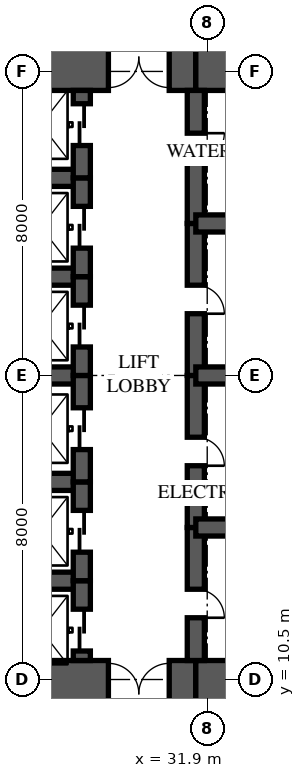
"""IFC4 building model, lengths in metres.
Left out: names, types, materials, properties, quantities, classifications, styles, units other than length and angle.
Written with IfcOpenShell. Run it as: python <this file> out.ifc"""

import sys

from ifc_helpers import new_model, si_unit, direction, frame, frame_2d, origin, place, context, subcontext, project, spatial, rectangle, extrude, element, fill, save


model = new_model("IFC4")
c1 = context("Model", 3, precision=1e-05, world=origin(), true_north=direction((0.0, 1.0)))
c2 = subcontext(c1, "Body", "Model", "MODEL_VIEW")
j1 = project(units=[si_unit("LENGTHUNIT", "METRE"), si_unit("PLANEANGLEUNIT", "RADIAN")], contexts=[c1])
p1 = place(None, origin())
s1 = spatial("IfcSite", under=j1, at=p1, CompositionType="ELEMENT")
p2 = place(p1, origin())
s2 = spatial("IfcBuilding", under=s1, at=p2, CompositionType="ELEMENT")
p3 = place(p2, origin())
s3 = spatial("IfcBuildingStorey", under=s2, at=p3, CompositionType="ELEMENT", Elevation=0.0)
p4 = place(p3, frame((26.0, 10.125, 0.0), z_axis=(0.0, 0.0, 1.0), x_axis=(1.0, 0.0, 0.0)))
e1 = element("IfcWall", 1, at=p4, inside=s3, PredefinedType="SHEAR", context=c2, shape_type="SweptSolid", body=[
    extrude(rectangle(XDim=5.6, YDim=1.75, at=frame_2d((2.8, 0.0))), origin(), (0.0, 0.0, 1.0), 6.0),
])
p5 = place(p4, frame((3.3, 0.0, 0.0)))
e2 = element("IfcOpeningElement", 2, at=p5, cuts=e1, PredefinedType="OPENING", context=c2, shape_type="SweptSolid", body=[
    extrude(rectangle(XDim=1.6, YDim=2.1, at=frame_2d((0.8, 1.05))), frame((0.0, 0.885, 0.0), z_axis=(0.0, -1.0, 0.0), x_axis=(1.0, 0.0, 0.0)), (0.0, 0.0, 1.0), 1.77),
])
for number, where, z_axis, x_axis in (
    (3, (31.6, 10.125, 0.0), (0.0, 0.0, 1.0), (1.0, 0.0, 0.0)),
    (4, (35.9, 26.875, 0.0), (0.0, 0.0, 1.0), (-1.0, 0.0, 0.0)),
):
    element("IfcWall", number, at=place(p3, frame(where, z_axis=z_axis, x_axis=x_axis)), inside=s3, PredefinedType="SHEAR", context=c2, shape_type="SweptSolid", body=[
        extrude(rectangle(XDim=4.3, YDim=1.75, at=frame_2d((2.15, 0.0))), origin(), (0.0, 0.0, 1.0), 6.0),
    ])
p6 = place(p3, frame((31.6, 26.875, 0.0), z_axis=(0.0, 0.0, 1.0), x_axis=(-1.0, 0.0, 0.0)))
e5 = element("IfcWall", 5, at=p6, inside=s3, PredefinedType="SHEAR", context=c2, shape_type="SweptSolid", body=[
    extrude(rectangle(XDim=5.6, YDim=1.75, at=frame_2d((2.8, 0.0))), origin(), (0.0, 0.0, 1.0), 6.0),
])
p7 = place(p6, frame((0.7, 0.0, 0.0)))
e6 = element("IfcOpeningElement", 6, at=p7, cuts=e5, PredefinedType="OPENING", context=c2, shape_type="SweptSolid", body=[
    extrude(rectangle(XDim=1.6, YDim=2.1, at=frame_2d((0.8, 1.05))), frame((0.0, 0.885, 0.0), z_axis=(0.0, -1.0, 0.0), x_axis=(1.0, 0.0, 0.0)), (0.0, 0.0, 1.0), 1.77),
])
p8 = place(p3, frame((28.6, 11.0, 0.0), z_axis=(0.0, 0.0, 1.0), x_axis=(0.0, 1.0, 0.0)))
e7 = element("IfcWall", 7, at=p8, inside=s3, PredefinedType="SHEAR", context=c2, shape_type="SweptSolid", body=[
    extrude(rectangle(XDim=2.1, YDim=0.45, at=frame_2d((1.05, 0.0))), origin(), (0.0, 0.0, 1.0), 6.0),
])
p9 = place(p8, frame((0.25, 0.0, 0.0)))
e8 = element("IfcOpeningElement", 8, at=p9, cuts=e7, PredefinedType="OPENING", context=c2, shape_type="SweptSolid", body=[
    extrude(rectangle(XDim=1.1, YDim=2.1, at=frame_2d((0.55, 1.05))), frame((0.0, 0.235, 0.0), z_axis=(0.0, -1.0, 0.0), x_axis=(1.0, 0.0, 0.0)), (0.0, 0.0, 1.0), 0.47),
])
p10 = place(p3, frame((28.6, 13.1, 0.0), z_axis=(0.0, 0.0, 1.0), x_axis=(0.0, 1.0, 0.0)))
e9 = element("IfcWall", 9, at=p10, inside=s3, PredefinedType="SHEAR", context=c2, shape_type="SweptSolid", body=[
    extrude(rectangle(XDim=2.6, YDim=0.45, at=frame_2d((1.3, 0.0))), origin(), (0.0, 0.0, 1.0), 6.0),
])
p11 = place(p10, frame((0.75, 0.0, 0.0)))
e10 = element("IfcOpeningElement", 10, at=p11, cuts=e9, PredefinedType="OPENING", context=c2, shape_type="SweptSolid", body=[
    extrude(rectangle(XDim=1.1, YDim=2.1, at=frame_2d((0.55, 1.05))), frame((0.0, 0.235, 0.0), z_axis=(0.0, -1.0, 0.0), x_axis=(1.0, 0.0, 0.0)), (0.0, 0.0, 1.0), 0.47),
])
p12 = place(p3, frame((28.6, 15.7, 0.0), z_axis=(0.0, 0.0, 1.0), x_axis=(0.0, 1.0, 0.0)))
e11 = element("IfcWall", 11, at=p12, inside=s3, PredefinedType="SHEAR", context=c2, shape_type="SweptSolid", body=[
    extrude(rectangle(XDim=2.8, YDim=0.45, at=frame_2d((1.4, 0.0))), origin(), (0.0, 0.0, 1.0), 6.0),
])
p13 = place(p12, frame((0.85, 0.0, 0.0)))
e12 = element("IfcOpeningElement", 12, at=p13, cuts=e11, PredefinedType="OPENING", context=c2, shape_type="SweptSolid", body=[
    extrude(rectangle(XDim=1.1, YDim=2.1, at=frame_2d((0.55, 1.05))), frame((0.0, 0.235, 0.0), z_axis=(0.0, -1.0, 0.0), x_axis=(1.0, 0.0, 0.0)), (0.0, 0.0, 1.0), 0.47),
])
p14 = place(p3, frame((28.6, 18.5, 0.0), z_axis=(0.0, 0.0, 1.0), x_axis=(0.0, 1.0, 0.0)))
e13 = element("IfcWall", 13, at=p14, inside=s3, PredefinedType="SHEAR", context=c2, shape_type="SweptSolid", body=[
    extrude(rectangle(XDim=2.6, YDim=0.45, at=frame_2d((1.3, 0.0))), origin(), (0.0, 0.0, 1.0), 6.0),
])
p15 = place(p14, frame((0.75, 0.0, 0.0)))
e14 = element("IfcOpeningElement", 14, at=p15, cuts=e13, PredefinedType="OPENING", context=c2, shape_type="SweptSolid", body=[
    extrude(rectangle(XDim=1.1, YDim=2.1, at=frame_2d((0.55, 1.05))), frame((0.0, 0.235, 0.0), z_axis=(0.0, -1.0, 0.0), x_axis=(1.0, 0.0, 0.0)), (0.0, 0.0, 1.0), 0.47),
])
p16 = place(p3, frame((28.6, 21.1, 0.0), z_axis=(0.0, 0.0, 1.0), x_axis=(0.0, 1.0, 0.0)))
e15 = element("IfcWall", 15, at=p16, inside=s3, PredefinedType="SHEAR", context=c2, shape_type="SweptSolid", body=[
    extrude(rectangle(XDim=2.6, YDim=0.45, at=frame_2d((1.3, 0.0))), origin(), (0.0, 0.0, 1.0), 6.0),
])
p17 = place(p16, frame((0.75, 0.0, 0.0)))
e16 = element("IfcOpeningElement", 16, at=p17, cuts=e15, PredefinedType="OPENING", context=c2, shape_type="SweptSolid", body=[
    extrude(rectangle(XDim=1.1, YDim=2.1, at=frame_2d((0.55, 1.05))), frame((0.0, 0.235, 0.0), z_axis=(0.0, -1.0, 0.0), x_axis=(1.0, 0.0, 0.0)), (0.0, 0.0, 1.0), 0.47),
])
p18 = place(p3, frame((28.6, 23.7, 0.0), z_axis=(0.0, 0.0, 1.0), x_axis=(0.0, 1.0, 0.0)))
e17 = element("IfcWall", 17, at=p18, inside=s3, PredefinedType="SHEAR", context=c2, shape_type="SweptSolid", body=[
    extrude(rectangle(XDim=2.3, YDim=0.45, at=frame_2d((1.15, 0.0))), origin(), (0.0, 0.0, 1.0), 6.0),
])
p19 = place(p18, frame((0.85, 0.0, 0.0)))
e18 = element("IfcOpeningElement", 18, at=p19, cuts=e17, PredefinedType="OPENING", context=c2, shape_type="SweptSolid", body=[
    extrude(rectangle(XDim=1.1, YDim=2.1, at=frame_2d((0.55, 1.05))), frame((0.0, 0.235, 0.0), z_axis=(0.0, -1.0, 0.0), x_axis=(1.0, 0.0, 0.0)), (0.0, 0.0, 1.0), 0.47),
])
p20 = place(p3, frame((31.6, 11.0, 0.0), z_axis=(0.0, 0.0, 1.0), x_axis=(0.0, 1.0, 0.0)))
e19 = element("IfcWall", 19, at=p20, inside=s3, PredefinedType="SHEAR", context=c2, shape_type="SweptSolid", body=[
    extrude(rectangle(XDim=3.5, YDim=0.45, at=frame_2d((1.75, 0.0))), origin(), (0.0, 0.0, 1.0), 6.0),
])
p21 = place(p20, frame((1.125, 0.0, 0.0)))
e20 = element("IfcOpeningElement", 20, at=p21, cuts=e19, PredefinedType="OPENING", context=c2, shape_type="SweptSolid", body=[
    extrude(rectangle(XDim=0.75, YDim=2.1, at=frame_2d((0.375, 1.05))), frame((0.0, 0.235, 0.0), z_axis=(0.0, -1.0, 0.0), x_axis=(1.0, 0.0, 0.0)), (0.0, 0.0, 1.0), 0.47),
])
p22 = place(p3, frame((31.6, 14.5, 0.0), z_axis=(0.0, 0.0, 1.0), x_axis=(0.0, 1.0, 0.0)))
e21 = element("IfcWall", 21, at=p22, inside=s3, PredefinedType="SHEAR", context=c2, shape_type="SweptSolid", body=[
    extrude(rectangle(XDim=4.0, YDim=0.45, at=frame_2d((2.0, 0.0))), origin(), (0.0, 0.0, 1.0), 6.0),
])
p23 = place(p22, frame((1.625, 0.0, 0.0)))
e22 = element("IfcOpeningElement", 22, at=p23, cuts=e21, PredefinedType="OPENING", context=c2, shape_type="SweptSolid", body=[
    extrude(rectangle(XDim=0.75, YDim=2.1, at=frame_2d((0.375, 1.05))), frame((0.0, 0.235, 0.0), z_axis=(0.0, -1.0, 0.0), x_axis=(1.0, 0.0, 0.0)), (0.0, 0.0, 1.0), 0.47),
])
p24 = place(p3, frame((31.6, 18.5, 0.0), z_axis=(0.0, 0.0, 1.0), x_axis=(0.0, 1.0, 0.0)))
e23 = element("IfcWall", 23, at=p24, inside=s3, PredefinedType="SHEAR", context=c2, shape_type="SweptSolid", body=[
    extrude(rectangle(XDim=4.0, YDim=0.45, at=frame_2d((2.0, 0.0))), origin(), (0.0, 0.0, 1.0), 6.0),
])
p25 = place(p24, frame((1.625, 0.0, 0.0)))
e24 = element("IfcOpeningElement", 24, at=p25, cuts=e23, PredefinedType="OPENING", context=c2, shape_type="SweptSolid", body=[
    extrude(rectangle(XDim=0.75, YDim=2.1, at=frame_2d((0.375, 1.05))), frame((0.0, 0.235, 0.0), z_axis=(0.0, -1.0, 0.0), x_axis=(1.0, 0.0, 0.0)), (0.0, 0.0, 1.0), 0.47),
])
p26 = place(p3, frame((31.6, 22.5, 0.0), z_axis=(0.0, 0.0, 1.0), x_axis=(0.0, 1.0, 0.0)))
e25 = element("IfcWall", 25, at=p26, inside=s3, PredefinedType="SHEAR", context=c2, shape_type="SweptSolid", body=[
    extrude(rectangle(XDim=3.5, YDim=0.45, at=frame_2d((1.75, 0.0))), origin(), (0.0, 0.0, 1.0), 6.0),
])
p27 = place(p26, frame((1.625, 0.0, 0.0)))
e26 = element("IfcOpeningElement", 26, at=p27, cuts=e25, PredefinedType="OPENING", context=c2, shape_type="SweptSolid", body=[
    extrude(rectangle(XDim=0.75, YDim=2.1, at=frame_2d((0.375, 1.05))), frame((0.0, 0.235, 0.0), z_axis=(0.0, -1.0, 0.0), x_axis=(1.0, 0.0, 0.0)), (0.0, 0.0, 1.0), 0.47),
])
for number, where, z_axis, x_axis in (
    (27, (26.0, 13.1, 0.0), (0.0, 0.0, 1.0), (1.0, 0.0, 0.0)),
    (28, (26.0, 15.7, 0.0), (0.0, 0.0, 1.0), (1.0, 0.0, 0.0)),
    (29, (26.0, 18.5, 0.0), (0.0, 0.0, 1.0), (1.0, 0.0, 0.0)),
    (30, (26.0, 21.1, 0.0), (0.0, 0.0, 1.0), (1.0, 0.0, 0.0)),
    (31, (26.0, 23.7, 0.0), (0.0, 0.0, 1.0), (1.0, 0.0, 0.0)),
):
    element("IfcWall", number, at=place(p3, frame(where, z_axis=z_axis, x_axis=x_axis)), inside=s3, PredefinedType="SHEAR", context=c2, shape_type="SweptSolid", body=[
        extrude(rectangle(XDim=2.6, YDim=0.45, at=frame_2d((1.3, 0.0))), origin(), (0.0, 0.0, 1.0), 6.0),
    ])
for number, where, z_axis, x_axis in (
    (32, (31.6, 14.5, 0.0), (0.0, 0.0, 1.0), (1.0, 0.0, 0.0)),
    (33, (31.6, 18.5, 0.0), (0.0, 0.0, 1.0), (1.0, 0.0, 0.0)),
    (34, (31.6, 22.5, 0.0), (0.0, 0.0, 1.0), (1.0, 0.0, 0.0)),
):
    element("IfcWall", number, at=place(p3, frame(where, z_axis=z_axis, x_axis=x_axis)), inside=s3, PredefinedType="SHEAR", context=c2, shape_type="SweptSolid", body=[
        extrude(rectangle(XDim=4.3, YDim=0.45, at=frame_2d((2.15, 0.0))), origin(), (0.0, 0.0, 1.0), 6.0),
    ])
p28 = place(p9, origin())
e35 = element("IfcDoor", 35, at=p28, inside=s3, OperationType="SLIDING_TO_LEFT", PredefinedType="DOOR", context=c2, shape_type="SweptSolid", body=[
    extrude(rectangle(XDim=1.1, YDim=2.1, at=frame_2d((0.55, 1.05))), frame((0.0, 0.025, 0.0), z_axis=(0.0, -1.0, 0.0), x_axis=(1.0, 0.0, 0.0)), (0.0, 0.0, 1.0), 0.05),
])
fill(e8, e35)
p29 = place(p11, origin())
e36 = element("IfcDoor", 36, at=p29, inside=s3, OperationType="SLIDING_TO_LEFT", PredefinedType="DOOR", context=c2, shape_type="SweptSolid", body=[
    extrude(rectangle(XDim=1.1, YDim=2.1, at=frame_2d((0.55, 1.05))), frame((0.0, 0.025, 0.0), z_axis=(0.0, -1.0, 0.0), x_axis=(1.0, 0.0, 0.0)), (0.0, 0.0, 1.0), 0.05),
])
fill(e10, e36)
p30 = place(p13, origin())
e37 = element("IfcDoor", 37, at=p30, inside=s3, OperationType="SLIDING_TO_LEFT", PredefinedType="DOOR", context=c2, shape_type="SweptSolid", body=[
    extrude(rectangle(XDim=1.1, YDim=2.1, at=frame_2d((0.55, 1.05))), frame((0.0, 0.025, 0.0), z_axis=(0.0, -1.0, 0.0), x_axis=(1.0, 0.0, 0.0)), (0.0, 0.0, 1.0), 0.05),
])
fill(e12, e37)
p31 = place(p15, origin())
e38 = element("IfcDoor", 38, at=p31, inside=s3, OperationType="SLIDING_TO_LEFT", PredefinedType="DOOR", context=c2, shape_type="SweptSolid", body=[
    extrude(rectangle(XDim=1.1, YDim=2.1, at=frame_2d((0.55, 1.05))), frame((0.0, 0.025, 0.0), z_axis=(0.0, -1.0, 0.0), x_axis=(1.0, 0.0, 0.0)), (0.0, 0.0, 1.0), 0.05),
])
fill(e14, e38)
p32 = place(p17, origin())
e39 = element("IfcDoor", 39, at=p32, inside=s3, OperationType="SLIDING_TO_LEFT", PredefinedType="DOOR", context=c2, shape_type="SweptSolid", body=[
    extrude(rectangle(XDim=1.1, YDim=2.1, at=frame_2d((0.55, 1.05))), frame((0.0, 0.025, 0.0), z_axis=(0.0, -1.0, 0.0), x_axis=(1.0, 0.0, 0.0)), (0.0, 0.0, 1.0), 0.05),
])
fill(e16, e39)
p33 = place(p19, origin())
e40 = element("IfcDoor", 40, at=p33, inside=s3, OperationType="SLIDING_TO_LEFT", PredefinedType="DOOR", context=c2, shape_type="SweptSolid", body=[
    extrude(rectangle(XDim=1.1, YDim=2.1, at=frame_2d((0.55, 1.05))), frame((0.0, 0.025, 0.0), z_axis=(0.0, -1.0, 0.0), x_axis=(1.0, 0.0, 0.0)), (0.0, 0.0, 1.0), 0.05),
])
fill(e18, e40)
p34 = place(p5, origin())
e41 = element("IfcDoor", 41, at=p34, inside=s3, OperationType="DOUBLE_DOOR_SINGLE_SWING", PredefinedType="DOOR", context=c2, shape_type="SweptSolid", body=[
    extrude(rectangle(XDim=1.6, YDim=2.1, at=frame_2d((0.8, 1.05))), frame((0.0, 0.025, 0.0), z_axis=(0.0, -1.0, 0.0), x_axis=(1.0, 0.0, 0.0)), (0.0, 0.0, 1.0), 0.05),
])
fill(e2, e41)
p35 = place(p7, origin())
e42 = element("IfcDoor", 42, at=p35, inside=s3, OperationType="DOUBLE_DOOR_SINGLE_SWING", PredefinedType="DOOR", context=c2, shape_type="SweptSolid", body=[
    extrude(rectangle(XDim=1.6, YDim=2.1, at=frame_2d((0.8, 1.05))), frame((0.0, 0.025, 0.0), z_axis=(0.0, -1.0, 0.0), x_axis=(1.0, 0.0, 0.0)), (0.0, 0.0, 1.0), 0.05),
])
fill(e6, e42)
p36 = place(p21, frame((0.75, 0.0, 0.0), z_axis=(0.0, 0.0, 1.0), x_axis=(-1.0, 0.0, 0.0)))
e43 = element("IfcDoor", 43, at=p36, inside=s3, OperationType="SINGLE_SWING_RIGHT", PredefinedType="DOOR", context=c2, shape_type="SweptSolid", body=[
    extrude(rectangle(XDim=0.75, YDim=2.1, at=frame_2d((0.375, 1.05))), frame((0.0, 0.025, 0.0), z_axis=(0.0, -1.0, 0.0), x_axis=(1.0, 0.0, 0.0)), (0.0, 0.0, 1.0), 0.05),
])
fill(e20, e43)
p37 = place(p23, frame((0.75, 0.0, 0.0), z_axis=(0.0, 0.0, 1.0), x_axis=(-1.0, 0.0, 0.0)))
e44 = element("IfcDoor", 44, at=p37, inside=s3, OperationType="SINGLE_SWING_RIGHT", PredefinedType="DOOR", context=c2, shape_type="SweptSolid", body=[
    extrude(rectangle(XDim=0.75, YDim=2.1, at=frame_2d((0.375, 1.05))), frame((0.0, 0.025, 0.0), z_axis=(0.0, -1.0, 0.0), x_axis=(1.0, 0.0, 0.0)), (0.0, 0.0, 1.0), 0.05),
])
fill(e22, e44)
p38 = place(p25, frame((0.75, 0.0, 0.0), z_axis=(0.0, 0.0, 1.0), x_axis=(-1.0, 0.0, 0.0)))
e45 = element("IfcDoor", 45, at=p38, inside=s3, OperationType="SINGLE_SWING_RIGHT", PredefinedType="DOOR", context=c2, shape_type="SweptSolid", body=[
    extrude(rectangle(XDim=0.75, YDim=2.1, at=frame_2d((0.375, 1.05))), frame((0.0, 0.025, 0.0), z_axis=(0.0, -1.0, 0.0), x_axis=(1.0, 0.0, 0.0)), (0.0, 0.0, 1.0), 0.05),
])
fill(e24, e45)
p39 = place(p27, frame((0.75, 0.0, 0.0), z_axis=(0.0, 0.0, 1.0), x_axis=(-1.0, 0.0, 0.0)))
e46 = element("IfcDoor", 46, at=p39, inside=s3, OperationType="SINGLE_SWING_LEFT", PredefinedType="DOOR", context=c2, shape_type="SweptSolid", body=[
    extrude(rectangle(XDim=0.75, YDim=2.1, at=frame_2d((0.375, 1.05))), frame((0.0, 0.025, 0.0), z_axis=(0.0, -1.0, 0.0), x_axis=(1.0, 0.0, 0.0)), (0.0, 0.0, 1.0), 0.05),
])
fill(e26, e46)
save(model, sys.argv[1])
